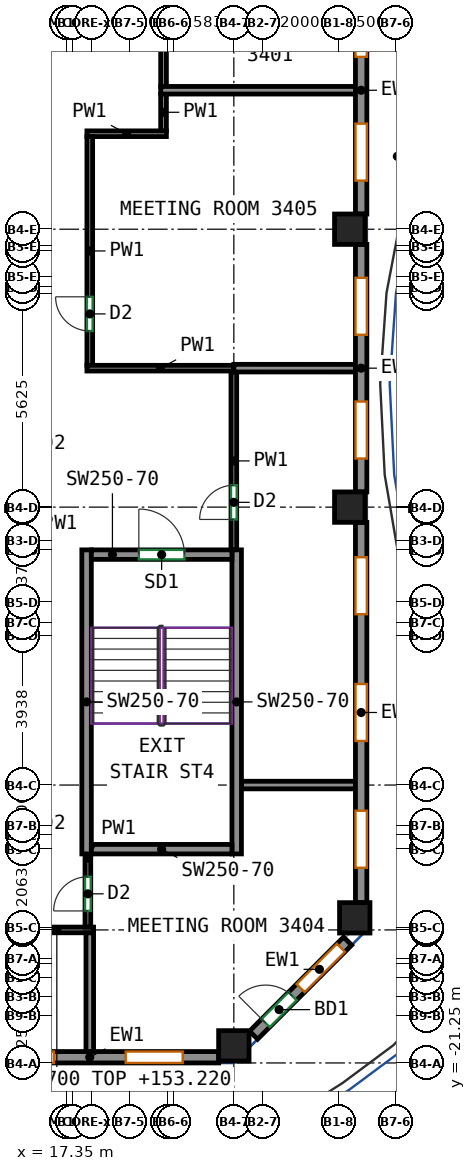
"""IFC4 building model, lengths in metres.
Left out: names, types, materials, properties, quantities, classifications, styles, units other than length and angle.
Written with IfcOpenShell. Run it as: python <this file> out.ifc"""

import sys

from ifc_helpers import new_model, si_unit, direction, frame, frame_2d, origin, origin_2d, place, context, subcontext, project, spatial, rectangle, extrude, source, transform, mapped, element, fill, save


model = new_model("IFC4")
c1 = context("Model", 3, precision=1e-05, world=origin(), true_north=direction((0.0, 1.0)))
c2 = subcontext(c1, "Body", "Model", "MODEL_VIEW")
j1 = project(units=[si_unit("LENGTHUNIT", "METRE"), si_unit("PLANEANGLEUNIT", "RADIAN")], contexts=[c1])
p1 = place(None, origin())
s1 = spatial("IfcSite", under=j1, at=p1, CompositionType="ELEMENT")
p2 = place(p1, origin())
s2 = spatial("IfcBuilding", under=s1, at=p2, CompositionType="ELEMENT")
p3 = place(p2, frame((0.0, 0.0, 150.7)))
s3 = spatial("IfcBuildingStorey", under=s2, at=p3, CompositionType="ELEMENT", Elevation=150.7)
m1 = source(origin(), c2, "Body", "SweptSolid", [
    extrude(rectangle(XDim=0.8, YDim=0.8, at=origin_2d()), origin(), (0.0, 0.0, 1.0), 3.12),
])
for number, where, z_axis, x_axis in (
    (1, (21.75, -20.8, 0.0), (0.0, 0.0, 1.0), (1.0, 0.0, 0.0)),
    (2, (24.8, -6.625, 0.0), (0.0, 0.0, 1.0), (1.0, 0.0, 0.0)),
    (3, (24.8, 0.688, 0.0), (0.0, 0.0, 1.0), (1.0, 0.0, 0.0)),
    (4, (24.932, -17.432, 0.0), (0.0, 0.0, 1.0), (1.0, 0.0, 0.0)),
):
    element("IfcColumn", number, at=place(p3, frame(where, z_axis=z_axis, x_axis=x_axis)), inside=s3, PredefinedType="COLUMN", context=c2, shape_type="MappedRepresentation", body=[
        mapped(m1, transform((0.0, 0.0, 0.0))),
    ])
m2 = source(origin(), c2, "Body", "SweptSolid", [
    extrude(rectangle(XDim=8.0, YDim=0.25, at=frame_2d((4.0, 0.0))), origin(), (0.0, 0.0, 1.0), 3.12),
])
for number, where, z_axis, x_axis in (
    (5, (17.875, -15.75, 0.0), (0.0, 0.0, 1.0), (0.0, 1.0, 0.0)),
    (6, (21.825, -15.75, 0.0), (0.0, 0.0, 1.0), (0.0, 1.0, 0.0)),
):
    element("IfcWall", number, at=place(p3, frame(where, z_axis=z_axis, x_axis=x_axis)), inside=s3, PredefinedType="SHEAR", context=c2, shape_type="MappedRepresentation", body=[
        mapped(m2, transform((0.0, 0.0, 0.0))),
    ])
m3 = source(origin(), c2, "Body", "SweptSolid", [
    extrude(rectangle(XDim=3.7, YDim=0.25, at=frame_2d((1.85, 0.0))), origin(), (0.0, 0.0, 1.0), 3.12),
])
p4 = place(p3, frame((18.0, -15.625, 0.0), z_axis=(0.0, 0.0, 1.0), x_axis=(1.0, 0.0, 0.0)))
e7 = element("IfcWall", 7, at=p4, inside=s3, PredefinedType="SHEAR", context=c2, shape_type="MappedRepresentation", body=[
    mapped(m3, transform((0.0, 0.0, 0.0))),
])
p5 = place(p3, frame((18.0, -7.875, 0.0), z_axis=(0.0, 0.0, 1.0), x_axis=(1.0, 0.0, 0.0)))
e8 = element("IfcWall", 8, at=p5, inside=s3, PredefinedType="SHEAR", context=c2, shape_type="MappedRepresentation", body=[
    mapped(m3, transform((0.0, 0.0, 0.0))),
])
p6 = place(p5, frame((1.25, 0.0, 0.0)))
e9 = element("IfcOpeningElement", 9, at=p6, cuts=e8, PredefinedType="OPENING", context=c2, shape_type="SweptSolid", body=[
    extrude(rectangle(XDim=1.2, YDim=2.1, at=frame_2d((0.6, 1.05))), frame((0.0, 0.135, 0.0), z_axis=(0.0, -1.0, 0.0), x_axis=(1.0, 0.0, 0.0)), (0.0, 0.0, 1.0), 0.27),
])
m4 = source(origin(), c2, "Body", "SweptSolid", [
    extrude(rectangle(XDim=6.783, YDim=0.3, at=frame_2d((3.392, 0.0))), origin(), (0.0, 0.0, 1.0), 3.12),
])
p7 = place(p3, frame((14.567, -21.1, 0.0), z_axis=(0.0, 0.0, 1.0), x_axis=(1.0, 0.0, 0.0)))
e10 = element("IfcWall", 10, at=p7, inside=s3, PredefinedType="SOLIDWALL", context=c2, shape_type="MappedRepresentation", body=[
    mapped(m4, transform((0.0, 0.0, 0.0))),
])
p8 = place(p7, frame((0.946, 0.0, 0.85)))
e11 = element("IfcOpeningElement", 11, at=p8, cuts=e10, PredefinedType="OPENING", context=c2, shape_type="SweptSolid", body=[
    extrude(rectangle(XDim=1.5, YDim=1.95, at=frame_2d((0.75, 0.975))), frame((0.0, 0.16, 0.0), z_axis=(0.0, -1.0, 0.0), x_axis=(1.0, 0.0, 0.0)), (0.0, 0.0, 1.0), 0.32),
])
p9 = place(p7, frame((4.337, 0.0, 0.85)))
e12 = element("IfcOpeningElement", 12, at=p9, cuts=e10, PredefinedType="OPENING", context=c2, shape_type="SweptSolid", body=[
    extrude(rectangle(XDim=1.5, YDim=1.95, at=frame_2d((0.75, 0.975))), frame((0.0, 0.16, 0.0), z_axis=(0.0, -1.0, 0.0), x_axis=(1.0, 0.0, 0.0)), (0.0, 0.0, 1.0), 0.32),
])
m5 = source(origin(), c2, "Body", "SweptSolid", [
    extrude(rectangle(XDim=3.5, YDim=0.3, at=frame_2d((1.75, 0.0))), origin(), (0.0, 0.0, 1.0), 3.12),
])
p10 = place(p3, frame((22.269, -20.519, 0.0), z_axis=(0.0, 0.0, 1.0), x_axis=(0.707141656123, 0.70707190453, 0.0)))
e13 = element("IfcWall", 13, at=p10, inside=s3, PredefinedType="SOLIDWALL", context=c2, shape_type="MappedRepresentation", body=[
    mapped(m5, transform((0.0, 0.0, 0.0))),
])
p11 = place(p10, frame((1.75, 0.0, 0.85)))
e14 = element("IfcOpeningElement", 14, at=p11, cuts=e13, PredefinedType="OPENING", context=c2, shape_type="SweptSolid", body=[
    extrude(rectangle(XDim=1.5, YDim=1.95, at=frame_2d((0.75, 0.975))), frame((0.0, 0.16, 0.0), z_axis=(0.0, -1.0, 0.0), x_axis=(1.0, 0.0, 0.0)), (0.0, 0.0, 1.0), 0.32),
])
p12 = place(p10, frame((0.45, 0.0, 0.0)))
e15 = element("IfcOpeningElement", 15, at=p12, cuts=e13, PredefinedType="OPENING", context=c2, shape_type="SweptSolid", body=[
    extrude(rectangle(XDim=1.0, YDim=2.1, at=frame_2d((0.5, 1.05))), frame((0.0, 0.16, 0.0), z_axis=(0.0, -1.0, 0.0), x_axis=(1.0, 0.0, 0.0)), (0.0, 0.0, 1.0), 0.32),
])
m6 = source(origin(), c2, "Body", "SweptSolid", [
    extrude(rectangle(XDim=10.007, YDim=0.3, at=frame_2d((5.003, 0.0))), origin(), (0.0, 0.0, 1.0), 3.12),
])
p13 = place(p3, frame((25.1, -17.032, 0.0), z_axis=(0.0, 0.0, 1.0), x_axis=(0.0, 1.0, 0.0)))
e16 = element("IfcWall", 16, at=p13, inside=s3, PredefinedType="SOLIDWALL", context=c2, shape_type="MappedRepresentation", body=[
    mapped(m6, transform((0.0, 0.0, 0.0))),
])
p14 = place(p13, frame((0.918, 0.0, 0.85)))
e17 = element("IfcOpeningElement", 17, at=p14, cuts=e16, PredefinedType="OPENING", context=c2, shape_type="SweptSolid", body=[
    extrude(rectangle(XDim=1.5, YDim=1.95, at=frame_2d((0.75, 0.975))), frame((0.0, 0.16, 0.0), z_axis=(0.0, -1.0, 0.0), x_axis=(1.0, 0.0, 0.0)), (0.0, 0.0, 1.0), 0.32),
])
p15 = place(p13, frame((4.253, 0.0, 0.85)))
e18 = element("IfcOpeningElement", 18, at=p15, cuts=e16, PredefinedType="OPENING", context=c2, shape_type="SweptSolid", body=[
    extrude(rectangle(XDim=1.5, YDim=1.95, at=frame_2d((0.75, 0.975))), frame((0.0, 0.16, 0.0), z_axis=(0.0, -1.0, 0.0), x_axis=(1.0, 0.0, 0.0)), (0.0, 0.0, 1.0), 0.32),
])
p16 = place(p13, frame((7.589, 0.0, 0.85)))
e19 = element("IfcOpeningElement", 19, at=p16, cuts=e16, PredefinedType="OPENING", context=c2, shape_type="SweptSolid", body=[
    extrude(rectangle(XDim=1.5, YDim=1.95, at=frame_2d((0.75, 0.975))), frame((0.0, 0.16, 0.0), z_axis=(0.0, -1.0, 0.0), x_axis=(1.0, 0.0, 0.0)), (0.0, 0.0, 1.0), 0.32),
])
m7 = source(origin(), c2, "Body", "SweptSolid", [
    extrude(rectangle(XDim=6.513, YDim=0.3, at=frame_2d((3.256, 0.0))), origin(), (0.0, 0.0, 1.0), 3.12),
])
p17 = place(p3, frame((25.1, -6.225, 0.0), z_axis=(0.0, 0.0, 1.0), x_axis=(0.0, 1.0, 0.0)))
e20 = element("IfcWall", 20, at=p17, inside=s3, PredefinedType="SOLIDWALL", context=c2, shape_type="MappedRepresentation", body=[
    mapped(m7, transform((0.0, 0.0, 0.0))),
])
p18 = place(p17, frame((0.878, 0.0, 0.85)))
e21 = element("IfcOpeningElement", 21, at=p18, cuts=e20, PredefinedType="OPENING", context=c2, shape_type="SweptSolid", body=[
    extrude(rectangle(XDim=1.5, YDim=1.95, at=frame_2d((0.75, 0.975))), frame((0.0, 0.16, 0.0), z_axis=(0.0, -1.0, 0.0), x_axis=(1.0, 0.0, 0.0)), (0.0, 0.0, 1.0), 0.32),
])
p19 = place(p17, frame((4.135, 0.0, 0.85)))
e22 = element("IfcOpeningElement", 22, at=p19, cuts=e20, PredefinedType="OPENING", context=c2, shape_type="SweptSolid", body=[
    extrude(rectangle(XDim=1.5, YDim=1.95, at=frame_2d((0.75, 0.975))), frame((0.0, 0.16, 0.0), z_axis=(0.0, -1.0, 0.0), x_axis=(1.0, 0.0, 0.0)), (0.0, 0.0, 1.0), 0.32),
])
p20 = place(p3, frame((25.1, 1.087, 0.0), z_axis=(0.0, 0.0, 1.0), x_axis=(0.0, 1.0, 0.0)))
e23 = element("IfcWall", 23, at=p20, inside=s3, PredefinedType="SOLIDWALL", context=c2, shape_type="MappedRepresentation", body=[
    mapped(m7, transform((0.0, 0.0, 0.0))),
])
p21 = place(p20, frame((0.878, 0.0, 0.85)))
e24 = element("IfcOpeningElement", 24, at=p21, cuts=e23, PredefinedType="OPENING", context=c2, shape_type="SweptSolid", body=[
    extrude(rectangle(XDim=1.5, YDim=1.95, at=frame_2d((0.75, 0.975))), frame((0.0, 0.16, 0.0), z_axis=(0.0, -1.0, 0.0), x_axis=(1.0, 0.0, 0.0)), (0.0, 0.0, 1.0), 0.32),
])
p22 = place(p20, frame((4.135, 0.0, 0.85)))
e25 = element("IfcOpeningElement", 25, at=p22, cuts=e23, PredefinedType="OPENING", context=c2, shape_type="SweptSolid", body=[
    extrude(rectangle(XDim=1.5, YDim=1.95, at=frame_2d((0.75, 0.975))), frame((0.0, 0.16, 0.0), z_axis=(0.0, -1.0, 0.0), x_axis=(1.0, 0.0, 0.0)), (0.0, 0.0, 1.0), 0.32),
])
p23 = place(p3, frame((16.125, -17.75, 0.0), z_axis=(0.0, 0.0, 1.0), x_axis=(1.0, 0.0, 0.0)))
e26 = element("IfcWall", 26, at=p23, inside=s3, PredefinedType="PARTITIONING", context=c2, shape_type="SweptSolid", body=[
    extrude(rectangle(XDim=1.934, YDim=0.15, at=frame_2d((0.967, 0.0))), origin(), (0.0, 0.0, 1.0), 2.52),
])
p24 = place(p3, frame((17.909, -17.675, 0.0), z_axis=(0.0, 0.0, 1.0), x_axis=(0.0, 1.0, 0.0)))
e27 = element("IfcWall", 27, at=p24, inside=s3, PredefinedType="PARTITIONING", context=c2, shape_type="SweptSolid", body=[
    extrude(rectangle(XDim=1.975, YDim=0.15, at=frame_2d((0.988, 0.0))), origin(), (0.0, 0.0, 1.0), 3.12),
])
p25 = place(p24, frame((0.425, 0.0, 0.0)))
e28 = element("IfcOpeningElement", 28, at=p25, cuts=e27, PredefinedType="OPENING", context=c2, shape_type="SweptSolid", body=[
    extrude(rectangle(XDim=0.9, YDim=2.1, at=frame_2d((0.45, 1.05))), frame((0.0, 0.085, 0.0), z_axis=(0.0, -1.0, 0.0), x_axis=(1.0, 0.0, 0.0)), (0.0, 0.0, 1.0), 0.17),
])
p26 = place(p3, frame((19.9, 4.434, 0.0), z_axis=(0.0, 0.0, 1.0), x_axis=(0.0, 1.0, 0.0)))
e29 = element("IfcWall", 29, at=p26, inside=s3, PredefinedType="PARTITIONING", context=c2, shape_type="SweptSolid", body=[
    extrude(rectangle(XDim=3.476, YDim=0.15, at=frame_2d((1.738, 0.0))), origin(), (0.0, 0.0, 1.0), 3.12),
])
p27 = place(p26, frame((1.653, 0.0, 0.0)))
e30 = element("IfcOpeningElement", 30, at=p27, cuts=e29, PredefinedType="OPENING", context=c2, shape_type="SweptSolid", body=[
    extrude(rectangle(XDim=1.0, YDim=2.1, at=frame_2d((0.5, 1.05))), frame((0.0, 0.085, 0.0), z_axis=(0.0, -1.0, 0.0), x_axis=(1.0, 0.0, 0.0)), (0.0, 0.0, 1.0), 0.17),
])
p28 = place(p3, frame((19.9, 3.275, 0.0), z_axis=(0.0, 0.0, 1.0), x_axis=(0.0, 1.0, 0.0)))
e31 = element("IfcWall", 31, at=p28, inside=s3, PredefinedType="PARTITIONING", context=c2, shape_type="SweptSolid", body=[
    extrude(rectangle(XDim=0.979, YDim=0.15, at=frame_2d((0.49, 0.0))), origin(), (0.0, 0.0, 1.0), 3.12),
])
p29 = place(p3, frame((17.884, 3.2, 0.0), z_axis=(0.0, 0.0, 1.0), x_axis=(1.0, 0.0, 0.0)))
e32 = element("IfcWall", 32, at=p29, inside=s3, PredefinedType="PARTITIONING", context=c2, shape_type="SweptSolid", body=[
    extrude(rectangle(XDim=2.091, YDim=0.15, at=frame_2d((1.045, 0.0))), origin(), (0.0, 0.0, 1.0), 3.12),
])
p30 = place(p3, frame((17.959, -2.894, 0.0), z_axis=(0.0, 0.0, 1.0), x_axis=(0.0, 1.0, 0.0)))
e33 = element("IfcWall", 33, at=p30, inside=s3, PredefinedType="PARTITIONING", context=c2, shape_type="SweptSolid", body=[
    extrude(rectangle(XDim=6.019, YDim=0.15, at=frame_2d((3.01, 0.0))), origin(), (0.0, 0.0, 1.0), 3.12),
])
p31 = place(p30, frame((0.903, 0.0, 0.0)))
e34 = element("IfcOpeningElement", 34, at=p31, cuts=e33, PredefinedType="OPENING", context=c2, shape_type="SweptSolid", body=[
    extrude(rectangle(XDim=0.9, YDim=2.1, at=frame_2d((0.45, 1.05))), frame((0.0, 0.085, 0.0), z_axis=(0.0, -1.0, 0.0), x_axis=(1.0, 0.0, 0.0)), (0.0, 0.0, 1.0), 0.17),
])
p32 = place(p3, frame((21.751, -2.969, 0.0), z_axis=(0.0, 0.0, 1.0), x_axis=(-1.0, 0.0, 0.0)))
e35 = element("IfcWall", 35, at=p32, inside=s3, PredefinedType="PARTITIONING", context=c2, shape_type="SweptSolid", body=[
    extrude(rectangle(XDim=3.867, YDim=0.15, at=frame_2d((1.934, 0.0))), origin(), (0.0, 0.0, 1.0), 3.12),
])
p33 = place(p3, frame((21.75, -7.75, 0.0), z_axis=(0.0, 0.0, 1.0), x_axis=(0.0, 1.0, 0.0)))
e36 = element("IfcWall", 36, at=p33, inside=s3, PredefinedType="PARTITIONING", context=c2, shape_type="SweptSolid", body=[
    extrude(rectangle(XDim=4.682, YDim=0.15, at=frame_2d((2.341, 0.0))), origin(), (0.0, 0.0, 1.0), 3.12),
])
p34 = place(p33, frame((0.801, 0.0, 0.0)))
e37 = element("IfcOpeningElement", 37, at=p34, cuts=e36, PredefinedType="OPENING", context=c2, shape_type="SweptSolid", body=[
    extrude(rectangle(XDim=0.9, YDim=2.1, at=frame_2d((0.45, 1.05))), frame((0.0, 0.085, 0.0), z_axis=(0.0, -1.0, 0.0), x_axis=(1.0, 0.0, 0.0)), (0.0, 0.0, 1.0), 0.17),
])
p35 = place(p3, frame((17.959, -21.0, 0.0), z_axis=(0.0, 0.0, 1.0), x_axis=(0.0, 1.0, 0.0)))
e38 = element("IfcWall", 38, at=p35, inside=s3, PredefinedType="PARTITIONING", context=c2, shape_type="SweptSolid", body=[
    extrude(rectangle(XDim=3.173, YDim=0.2, at=frame_2d((1.586, 0.0))), origin(), (0.0, 0.0, 1.0), 3.12),
])
p36 = place(p3, frame((25.0, -13.938, 0.0), z_axis=(0.0, 0.0, 1.0), x_axis=(-1.0, 0.0, 0.0)))
e39 = element("IfcWall", 39, at=p36, inside=s3, PredefinedType="PARTITIONING", context=c2, shape_type="SweptSolid", body=[
    extrude(rectangle(XDim=3.05, YDim=0.2, at=frame_2d((1.525, 0.0))), origin(), (0.0, 0.0, 1.0), 3.12),
])
p37 = place(p3, frame((19.827, 4.344, 0.0), z_axis=(0.0, 0.0, 1.0), x_axis=(1.0, 0.0, 0.0)))
e40 = element("IfcWall", 40, at=p37, inside=s3, PredefinedType="PARTITIONING", context=c2, shape_type="SweptSolid", body=[
    extrude(rectangle(XDim=5.173, YDim=0.2, at=frame_2d((2.586, 0.0))), origin(), (0.0, 0.0, 1.0), 3.12),
])
p38 = place(p3, frame((21.751, -2.968, 0.0), z_axis=(0.0, 0.0, 1.0), x_axis=(0.999999954829, -0.000300571071, 0.0)))
e41 = element("IfcWall", 41, at=p38, inside=s3, PredefinedType="PARTITIONING", context=c2, shape_type="SweptSolid", body=[
    extrude(rectangle(XDim=3.249, YDim=0.2, at=frame_2d((1.625, 0.0))), origin(), (0.0, 0.0, 1.0), 3.12),
])
p39 = place(p8, origin())
e42 = element("IfcWindow", 42, at=p39, inside=s3, PartitioningType="SINGLE_PANEL", PredefinedType="WINDOW", context=c2, shape_type="SweptSolid", body=[
    extrude(rectangle(XDim=1.5, YDim=1.95, at=frame_2d((0.75, 0.975))), frame((0.0, 0.03, 0.0), z_axis=(0.0, -1.0, 0.0), x_axis=(1.0, 0.0, 0.0)), (0.0, 0.0, 1.0), 0.06),
])
fill(e11, e42)
p40 = place(p9, origin())
e43 = element("IfcWindow", 43, at=p40, inside=s3, PartitioningType="SINGLE_PANEL", PredefinedType="WINDOW", context=c2, shape_type="SweptSolid", body=[
    extrude(rectangle(XDim=1.5, YDim=1.95, at=frame_2d((0.75, 0.975))), frame((0.0, 0.03, 0.0), z_axis=(0.0, -1.0, 0.0), x_axis=(1.0, 0.0, 0.0)), (0.0, 0.0, 1.0), 0.06),
])
fill(e12, e43)
p41 = place(p11, origin())
e44 = element("IfcWindow", 44, at=p41, inside=s3, PartitioningType="SINGLE_PANEL", PredefinedType="WINDOW", context=c2, shape_type="SweptSolid", body=[
    extrude(rectangle(XDim=1.5, YDim=1.95, at=frame_2d((0.75, 0.975))), frame((0.0, 0.03, 0.0), z_axis=(0.0, -1.0, 0.0), x_axis=(1.0, 0.0, 0.0)), (0.0, 0.0, 1.0), 0.06),
])
fill(e14, e44)
p42 = place(p12, origin())
e45 = element("IfcDoor", 45, at=p42, inside=s3, OperationType="SINGLE_SWING_LEFT", PredefinedType="DOOR", context=c2, shape_type="SweptSolid", body=[
    extrude(rectangle(XDim=1.0, YDim=2.1, at=frame_2d((0.5, 1.05))), frame((0.0, 0.025, 0.0), z_axis=(0.0, -1.0, 0.0), x_axis=(1.0, 0.0, 0.0)), (0.0, 0.0, 1.0), 0.05),
])
fill(e15, e45)
p43 = place(p14, origin())
e46 = element("IfcWindow", 46, at=p43, inside=s3, PartitioningType="SINGLE_PANEL", PredefinedType="WINDOW", context=c2, shape_type="SweptSolid", body=[
    extrude(rectangle(XDim=1.5, YDim=1.95, at=frame_2d((0.75, 0.975))), frame((0.0, 0.03, 0.0), z_axis=(0.0, -1.0, 0.0), x_axis=(1.0, 0.0, 0.0)), (0.0, 0.0, 1.0), 0.06),
])
fill(e17, e46)
p44 = place(p15, origin())
e47 = element("IfcWindow", 47, at=p44, inside=s3, PartitioningType="SINGLE_PANEL", PredefinedType="WINDOW", context=c2, shape_type="SweptSolid", body=[
    extrude(rectangle(XDim=1.5, YDim=1.95, at=frame_2d((0.75, 0.975))), frame((0.0, 0.03, 0.0), z_axis=(0.0, -1.0, 0.0), x_axis=(1.0, 0.0, 0.0)), (0.0, 0.0, 1.0), 0.06),
])
fill(e18, e47)
p45 = place(p16, origin())
e48 = element("IfcWindow", 48, at=p45, inside=s3, PartitioningType="SINGLE_PANEL", PredefinedType="WINDOW", context=c2, shape_type="SweptSolid", body=[
    extrude(rectangle(XDim=1.5, YDim=1.95, at=frame_2d((0.75, 0.975))), frame((0.0, 0.03, 0.0), z_axis=(0.0, -1.0, 0.0), x_axis=(1.0, 0.0, 0.0)), (0.0, 0.0, 1.0), 0.06),
])
fill(e19, e48)
p46 = place(p18, origin())
e49 = element("IfcWindow", 49, at=p46, inside=s3, PartitioningType="SINGLE_PANEL", PredefinedType="WINDOW", context=c2, shape_type="SweptSolid", body=[
    extrude(rectangle(XDim=1.5, YDim=1.95, at=frame_2d((0.75, 0.975))), frame((0.0, 0.03, 0.0), z_axis=(0.0, -1.0, 0.0), x_axis=(1.0, 0.0, 0.0)), (0.0, 0.0, 1.0), 0.06),
])
fill(e21, e49)
p47 = place(p19, origin())
e50 = element("IfcWindow", 50, at=p47, inside=s3, PartitioningType="SINGLE_PANEL", PredefinedType="WINDOW", context=c2, shape_type="SweptSolid", body=[
    extrude(rectangle(XDim=1.5, YDim=1.95, at=frame_2d((0.75, 0.975))), frame((0.0, 0.03, 0.0), z_axis=(0.0, -1.0, 0.0), x_axis=(1.0, 0.0, 0.0)), (0.0, 0.0, 1.0), 0.06),
])
fill(e22, e50)
p48 = place(p21, origin())
e51 = element("IfcWindow", 51, at=p48, inside=s3, PartitioningType="SINGLE_PANEL", PredefinedType="WINDOW", context=c2, shape_type="SweptSolid", body=[
    extrude(rectangle(XDim=1.5, YDim=1.95, at=frame_2d((0.75, 0.975))), frame((0.0, 0.03, 0.0), z_axis=(0.0, -1.0, 0.0), x_axis=(1.0, 0.0, 0.0)), (0.0, 0.0, 1.0), 0.06),
])
fill(e24, e51)
p49 = place(p22, origin())
e52 = element("IfcWindow", 52, at=p49, inside=s3, PartitioningType="SINGLE_PANEL", PredefinedType="WINDOW", context=c2, shape_type="SweptSolid", body=[
    extrude(rectangle(XDim=1.5, YDim=1.95, at=frame_2d((0.75, 0.975))), frame((0.0, 0.03, 0.0), z_axis=(0.0, -1.0, 0.0), x_axis=(1.0, 0.0, 0.0)), (0.0, 0.0, 1.0), 0.06),
])
fill(e25, e52)
p50 = place(p6, origin())
e53 = element("IfcDoor", 53, at=p50, inside=s3, OperationType="DOUBLE_DOOR_SINGLE_SWING", PredefinedType="DOOR", context=c2, shape_type="SweptSolid", body=[
    extrude(rectangle(XDim=1.2, YDim=2.1, at=frame_2d((0.6, 1.05))), frame((0.0, 0.025, 0.0), z_axis=(0.0, -1.0, 0.0), x_axis=(1.0, 0.0, 0.0)), (0.0, 0.0, 1.0), 0.05),
])
fill(e9, e53)
p51 = place(p25, origin())
e54 = element("IfcDoor", 54, at=p51, inside=s3, OperationType="SINGLE_SWING_LEFT", PredefinedType="DOOR", context=c2, shape_type="SweptSolid", body=[
    extrude(rectangle(XDim=0.9, YDim=2.1, at=frame_2d((0.45, 1.05))), frame((0.0, 0.025, 0.0), z_axis=(0.0, -1.0, 0.0), x_axis=(1.0, 0.0, 0.0)), (0.0, 0.0, 1.0), 0.05),
])
fill(e28, e54)
p52 = place(p34, origin())
e55 = element("IfcDoor", 55, at=p52, inside=s3, OperationType="SINGLE_SWING_LEFT", PredefinedType="DOOR", context=c2, shape_type="SweptSolid", body=[
    extrude(rectangle(XDim=0.9, YDim=2.1, at=frame_2d((0.45, 1.05))), frame((0.0, 0.025, 0.0), z_axis=(0.0, -1.0, 0.0), x_axis=(1.0, 0.0, 0.0)), (0.0, 0.0, 1.0), 0.05),
])
fill(e37, e55)
p53 = place(p31, origin())
e56 = element("IfcDoor", 56, at=p53, inside=s3, OperationType="SINGLE_SWING_RIGHT", PredefinedType="DOOR", context=c2, shape_type="SweptSolid", body=[
    extrude(rectangle(XDim=0.9, YDim=2.1, at=frame_2d((0.45, 1.05))), frame((0.0, 0.025, 0.0), z_axis=(0.0, -1.0, 0.0), x_axis=(1.0, 0.0, 0.0)), (0.0, 0.0, 1.0), 0.05),
])
fill(e34, e56)
save(model, sys.argv[1])
